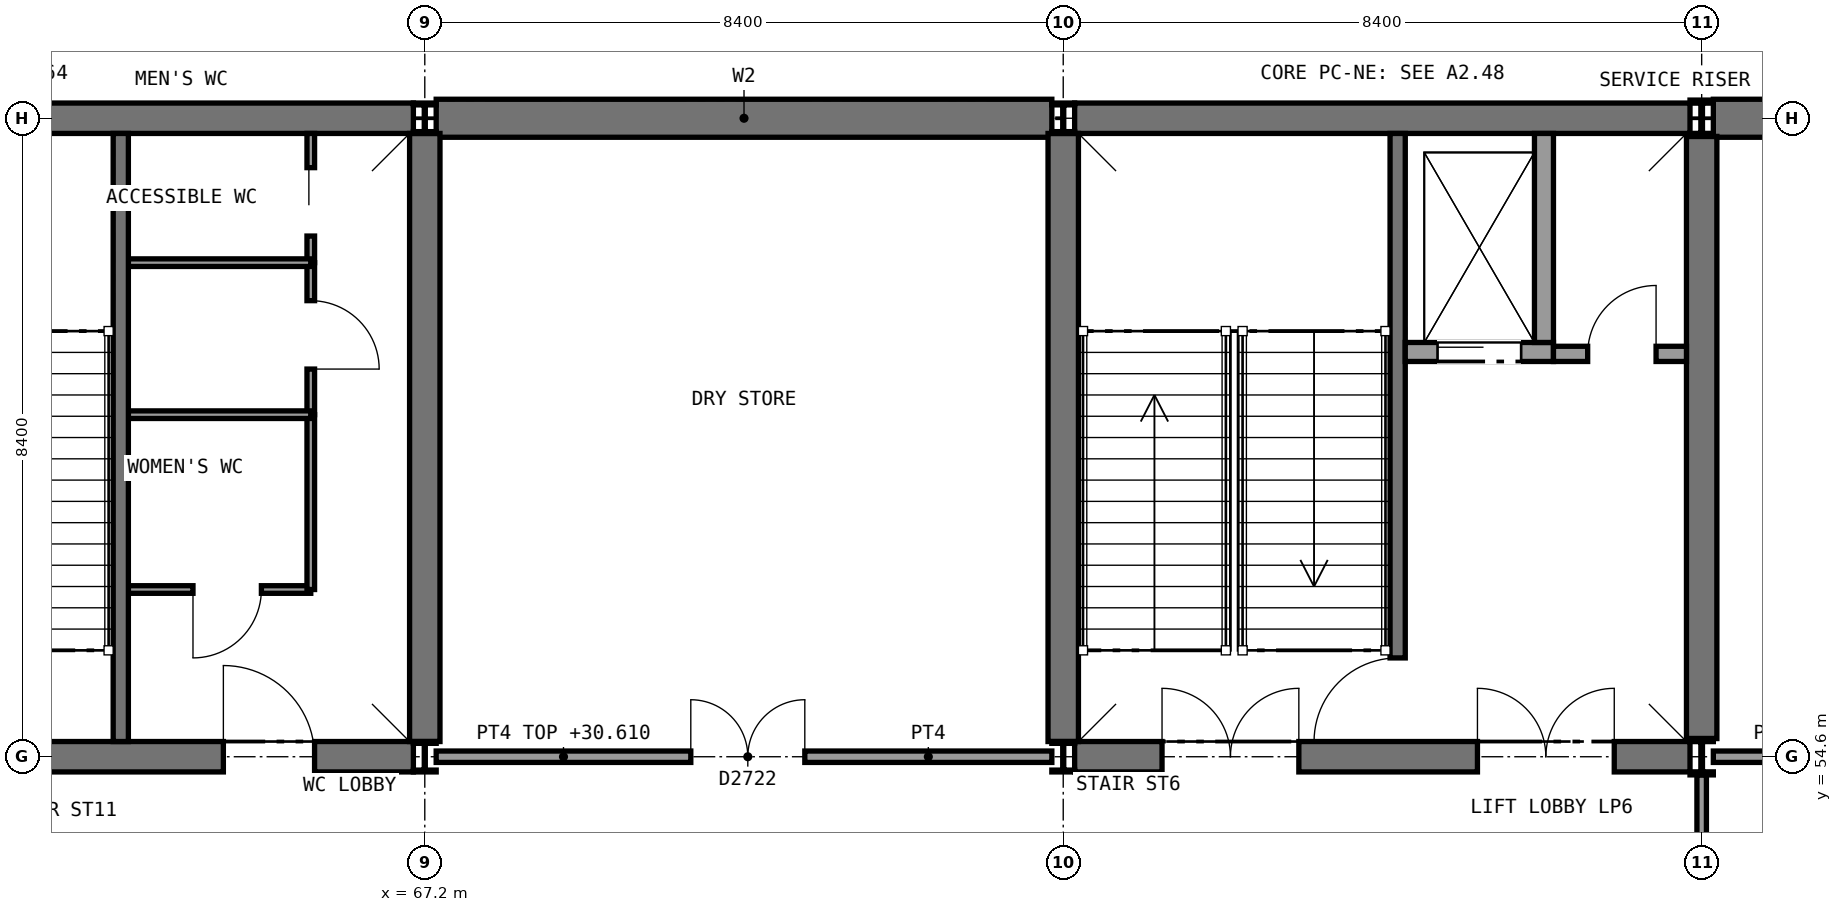
"""IFC4 building model, lengths in metres.
Left out: names, types, materials, properties, quantities, classifications, styles, units other than length and angle.
Written with IfcOpenShell. Run it as: python <this file> out.ifc"""

import sys

from ifc_helpers import new_model, si_unit, direction, frame, frame_2d, origin, origin_2d, place, context, subcontext, project, spatial, rectangle, i_section, extrude, element, fill, save


model = new_model("IFC4")
c1 = context("Model", 3, precision=1e-05, world=origin(), true_north=direction((0.0, 1.0)))
c2 = subcontext(c1, "Body", "Model", "MODEL_VIEW")
j1 = project(units=[si_unit("LENGTHUNIT", "METRE"), si_unit("PLANEANGLEUNIT", "RADIAN")], contexts=[c1])
p1 = place(None, origin())
s1 = spatial("IfcSite", under=j1, at=p1, CompositionType="ELEMENT")
p2 = place(p1, origin())
s2 = spatial("IfcBuilding", under=s1, at=p2, CompositionType="ELEMENT")
p3 = place(p2, frame((0.0, 0.0, 25.8)))
s3 = spatial("IfcBuildingStorey", under=s2, at=p3, CompositionType="ELEMENT", Elevation=25.8)
p4 = place(p3, frame((67.35, 63.0, 0.0), z_axis=(0.0, 0.0, 1.0), x_axis=(1.0, 0.0, 0.0)))
e1 = element("IfcWall", 1, at=p4, inside=s3, PredefinedType="SHEAR", context=c2, shape_type="SweptSolid", body=[
    extrude(rectangle(XDim=8.1, YDim=0.5, at=frame_2d((4.05, 0.0))), origin(), (0.0, 0.0, 1.0), 5.2),
])
p5 = place(p3, frame((84.154, 63.0, 0.0), z_axis=(0.0, 0.0, 1.0), x_axis=(1.0, 0.0, 0.0)))
e2 = element("IfcWall", 2, at=p5, inside=s3, PredefinedType="SHEAR", context=c2, shape_type="SweptSolid", body=[
    extrude(rectangle(XDim=8.093, YDim=0.5, at=frame_2d((4.046, 0.0))), origin(), (0.0, 0.0, 1.0), 5.25),
])
p6 = place(p3, frame((75.75, 63.0, 0.0), z_axis=(0.0, 0.0, 1.0), x_axis=(1.0, 0.0, 0.0)))
e3 = element("IfcWall", 3, at=p6, inside=s3, PredefinedType="SHEAR", context=c2, shape_type="SweptSolid", body=[
    extrude(rectangle(XDim=8.096, YDim=0.4, at=frame_2d((4.048, 0.0))), origin(), (0.0, 0.0, 1.0), 4.51),
])
p7 = place(p3, frame((75.75, 54.6, 0.0), z_axis=(0.0, 0.0, 1.0), x_axis=(1.0, 0.0, 0.0)))
e4 = element("IfcWall", 4, at=p7, inside=s3, PredefinedType="SHEAR", context=c2, shape_type="SweptSolid", body=[
    extrude(rectangle(XDim=8.096, YDim=0.4, at=frame_2d((4.048, 0.0))), origin(), (0.0, 0.0, 1.0), 4.51),
])
p8 = place(p7, frame((1.15, 0.0, 0.0)))
e5 = element("IfcOpeningElement", 5, at=p8, cuts=e4, PredefinedType="OPENING", context=c2, shape_type="SweptSolid", body=[
    extrude(rectangle(XDim=1.8, YDim=2.1, at=frame_2d((0.9, 1.05))), frame((0.0, 0.21, 0.0), z_axis=(0.0, -1.0, 0.0), x_axis=(1.0, 0.0, 0.0)), (0.0, 0.0, 1.0), 0.42),
])
p9 = place(p7, frame((5.3, 0.0, 0.0)))
e6 = element("IfcOpeningElement", 6, at=p9, cuts=e4, PredefinedType="OPENING", context=c2, shape_type="SweptSolid", body=[
    extrude(rectangle(XDim=1.8, YDim=2.1, at=frame_2d((0.9, 1.05))), frame((0.0, 0.21, 0.0), z_axis=(0.0, -1.0, 0.0), x_axis=(1.0, 0.0, 0.0)), (0.0, 0.0, 1.0), 0.42),
])
p10 = place(p3, frame((75.6, 54.8, 0.0), z_axis=(0.0, 0.0, 1.0), x_axis=(0.0, 1.0, 0.0)))
e7 = element("IfcWall", 7, at=p10, inside=s3, PredefinedType="SHEAR", context=c2, shape_type="SweptSolid", body=[
    extrude(rectangle(XDim=8.0, YDim=0.4, at=frame_2d((4.0, 0.0))), origin(), (0.0, 0.0, 1.0), 5.2),
])
p11 = place(p3, frame((84.0, 54.839, 0.0), z_axis=(0.0, 0.0, 1.0), x_axis=(0.0, 1.0, 0.0)))
e8 = element("IfcWall", 8, at=p11, inside=s3, PredefinedType="SHEAR", context=c2, shape_type="SweptSolid", body=[
    extrude(rectangle(XDim=7.922, YDim=0.4, at=frame_2d((3.961, 0.0))), origin(), (0.0, 0.0, 1.0), 5.2),
])
p12 = place(p3, frame((58.95, 63.0, 0.0), z_axis=(0.0, 0.0, 1.0), x_axis=(1.0, 0.0, 0.0)))
e9 = element("IfcWall", 9, at=p12, inside=s3, PredefinedType="SHEAR", context=c2, shape_type="SweptSolid", body=[
    extrude(rectangle(XDim=8.1, YDim=0.4, at=frame_2d((4.05, 0.0))), origin(), (0.0, 0.0, 1.0), 4.51),
])
p13 = place(p3, frame((58.95, 54.6, 0.0), z_axis=(0.0, 0.0, 1.0), x_axis=(1.0, 0.0, 0.0)))
e10 = element("IfcWall", 10, at=p13, inside=s3, PredefinedType="SHEAR", context=c2, shape_type="SweptSolid", body=[
    extrude(rectangle(XDim=8.1, YDim=0.4, at=frame_2d((4.05, 0.0))), origin(), (0.0, 0.0, 1.0), 4.51),
])
p14 = place(p13, frame((1.15, 0.0, 0.0)))
e11 = element("IfcOpeningElement", 11, at=p14, cuts=e10, PredefinedType="OPENING", context=c2, shape_type="SweptSolid", body=[
    extrude(rectangle(XDim=1.8, YDim=2.1, at=frame_2d((0.9, 1.05))), frame((0.0, 0.21, 0.0), z_axis=(0.0, -1.0, 0.0), x_axis=(1.0, 0.0, 0.0)), (0.0, 0.0, 1.0), 0.42),
])
p15 = place(p13, frame((5.6, 0.0, 0.0)))
e12 = element("IfcOpeningElement", 12, at=p15, cuts=e10, PredefinedType="OPENING", context=c2, shape_type="SweptSolid", body=[
    extrude(rectangle(XDim=1.2, YDim=2.1, at=frame_2d((0.6, 1.05))), frame((0.0, 0.21, 0.0), z_axis=(0.0, -1.0, 0.0), x_axis=(1.0, 0.0, 0.0)), (0.0, 0.0, 1.0), 0.42),
])
p16 = place(p3, frame((67.2, 54.8, 0.0), z_axis=(0.0, 0.0, 1.0), x_axis=(0.0, 1.0, 0.0)))
e13 = element("IfcWall", 13, at=p16, inside=s3, PredefinedType="SHEAR", context=c2, shape_type="SweptSolid", body=[
    extrude(rectangle(XDim=8.0, YDim=0.4, at=frame_2d((4.0, 0.0))), origin(), (0.0, 0.0, 1.0), 5.2),
])
for number, where, z_axis, x_axis in (
    (14, (67.2, 54.6, 0.0), (0.0, 0.0, 1.0), (1.0, 0.0, 0.0)),
    (15, (67.2, 63.0, 0.0), (0.0, 0.0, 1.0), (1.0, 0.0, 0.0)),
    (16, (75.6, 54.6, 0.0), (0.0, 0.0, 1.0), (1.0, 0.0, 0.0)),
    (17, (75.6, 63.0, 0.0), (0.0, 0.0, 1.0), (1.0, 0.0, 0.0)),
):
    element("IfcColumn", number, at=place(p3, frame(where, z_axis=z_axis, x_axis=x_axis)), inside=s3, PredefinedType="COLUMN", context=c2, shape_type="SweptSolid", body=[
        extrude(i_section(OverallWidth=0.3, OverallDepth=0.4, WebThickness=0.013, FlangeThickness=0.024, FilletRadius=0.027, at=origin_2d()), origin(), (0.0, 0.0, 1.0), 5.4),
    ])
for number, where, z_axis, x_axis in (
    (18, (84.0, 54.6, 0.0), (0.0, 0.0, 1.0), (1.0, 0.0, 0.0)),
    (19, (84.0, 63.0, 0.0), (0.0, 0.0, 1.0), (1.0, 0.0, 0.0)),
):
    element("IfcColumn", number, at=place(p3, frame(where, z_axis=z_axis, x_axis=x_axis)), inside=s3, PredefinedType="COLUMN", context=c2, shape_type="SweptSolid", body=[
        extrude(i_section(OverallWidth=0.307, OverallDepth=0.478, WebThickness=0.021, FlangeThickness=0.04, FilletRadius=0.027, at=origin_2d()), origin(), (0.0, 0.0, 1.0), 5.4),
    ])
p17 = place(p3, frame((63.3, 56.8, 0.0), z_axis=(0.0, 0.0, 1.0), x_axis=(1.0, 0.0, 0.0)))
e20 = element("IfcWall", 20, at=p17, inside=s3, PredefinedType="PARTITIONING", context=c2, shape_type="SweptSolid", body=[
    extrude(rectangle(XDim=2.4, YDim=0.1, at=frame_2d((1.2, 0.0))), origin(), (0.0, 0.0, 1.0), 5.2),
])
p18 = place(p17, frame((0.85, 0.0, 0.0)))
e21 = element("IfcOpeningElement", 21, at=p18, cuts=e20, PredefinedType="OPENING", context=c2, shape_type="SweptSolid", body=[
    extrude(rectangle(XDim=0.9, YDim=2.1, at=frame_2d((0.45, 1.05))), frame((0.0, 0.06, 0.0), z_axis=(0.0, -1.0, 0.0), x_axis=(1.0, 0.0, 0.0)), (0.0, 0.0, 1.0), 0.12),
])
p19 = place(p3, frame((65.7, 56.8, 0.0), z_axis=(0.0, 0.0, 1.0), x_axis=(0.0, 1.0, 0.0)))
e22 = element("IfcWall", 22, at=p19, inside=s3, PredefinedType="PARTITIONING", context=c2, shape_type="SweptSolid", body=[
    extrude(rectangle(XDim=2.3, YDim=0.1, at=frame_2d((1.15, 0.0))), origin(), (0.0, 0.0, 1.0), 5.2),
])
p20 = place(p3, frame((65.7, 59.1, 0.0), z_axis=(0.0, 0.0, 1.0), x_axis=(0.0, 1.0, 0.0)))
e23 = element("IfcWall", 23, at=p20, inside=s3, PredefinedType="PARTITIONING", context=c2, shape_type="SweptSolid", body=[
    extrude(rectangle(XDim=2.0, YDim=0.1, at=frame_2d((1.0, 0.0))), origin(), (0.0, 0.0, 1.0), 5.2),
])
p21 = place(p20, frame((0.6, 0.0, 0.0)))
e24 = element("IfcOpeningElement", 24, at=p21, cuts=e23, PredefinedType="OPENING", context=c2, shape_type="SweptSolid", body=[
    extrude(rectangle(XDim=0.9, YDim=2.1, at=frame_2d((0.45, 1.05))), frame((0.0, 0.06, 0.0), z_axis=(0.0, -1.0, 0.0), x_axis=(1.0, 0.0, 0.0)), (0.0, 0.0, 1.0), 0.12),
])
p22 = place(p3, frame((65.7, 61.1, 0.0), z_axis=(0.0, 0.0, 1.0), x_axis=(0.0, 1.0, 0.0)))
e25 = element("IfcWall", 25, at=p22, inside=s3, PredefinedType="PARTITIONING", context=c2, shape_type="SweptSolid", body=[
    extrude(rectangle(XDim=1.7, YDim=0.1, at=frame_2d((0.85, 0.0))), origin(), (0.0, 0.0, 1.0), 5.2),
])
p23 = place(p22, frame((0.35, 0.0, 0.0)))
e26 = element("IfcOpeningElement", 26, at=p23, cuts=e25, PredefinedType="OPENING", context=c2, shape_type="SweptSolid", body=[
    extrude(rectangle(XDim=0.9, YDim=2.1, at=frame_2d((0.45, 1.05))), frame((0.0, 0.06, 0.0), z_axis=(0.0, -1.0, 0.0), x_axis=(1.0, 0.0, 0.0)), (0.0, 0.0, 1.0), 0.12),
])
for number, where, z_axis, x_axis in (
    (27, (63.3, 59.1, 0.0), (0.0, 0.0, 1.0), (1.0, 0.0, 0.0)),
    (28, (63.3, 61.1, 0.0), (0.0, 0.0, 1.0), (1.0, 0.0, 0.0)),
):
    element("IfcWall", number, at=place(p3, frame(where, z_axis=z_axis, x_axis=x_axis)), inside=s3, PredefinedType="PARTITIONING", context=c2, shape_type="SweptSolid", body=[
        extrude(rectangle(XDim=2.4, YDim=0.1, at=frame_2d((1.2, 0.0))), origin(), (0.0, 0.0, 1.0), 5.2),
    ])
p24 = place(p3, frame((67.35, 54.6, 0.0), z_axis=(0.0, 0.0, 1.0), x_axis=(1.0, 0.0, 0.0)))
e29 = element("IfcWall", 29, at=p24, inside=s3, PredefinedType="SOLIDWALL", context=c2, shape_type="SweptSolid", body=[
    extrude(rectangle(XDim=8.1, YDim=0.15, at=frame_2d((4.05, 0.0))), origin(), (0.0, 0.0, 1.0), 4.81),
])
p25 = place(p24, frame((3.35, 0.0, 0.0)))
e30 = element("IfcOpeningElement", 30, at=p25, cuts=e29, PredefinedType="OPENING", context=c2, shape_type="SweptSolid", body=[
    extrude(rectangle(XDim=1.5, YDim=2.1, at=frame_2d((0.75, 1.05))), frame((0.0, 0.085, 0.0), z_axis=(0.0, -1.0, 0.0), x_axis=(1.0, 0.0, 0.0)), (0.0, 0.0, 1.0), 0.17),
])
p26 = place(p3, frame((84.154, 54.6, 0.0), z_axis=(0.0, 0.0, 1.0), x_axis=(1.0, 0.0, 0.0)))
e31 = element("IfcWall", 31, at=p26, inside=s3, PredefinedType="SOLIDWALL", context=c2, shape_type="SweptSolid", body=[
    extrude(rectangle(XDim=8.093, YDim=0.15, at=frame_2d((4.046, 0.0))), origin(), (0.0, 0.0, 1.0), 4.92),
])
p27 = place(p26, frame((3.35, 0.0, 0.0)))
e32 = element("IfcOpeningElement", 32, at=p27, cuts=e31, PredefinedType="OPENING", context=c2, shape_type="SweptSolid", body=[
    extrude(rectangle(XDim=1.5, YDim=2.1, at=frame_2d((0.75, 1.05))), frame((0.0, 0.085, 0.0), z_axis=(0.0, -1.0, 0.0), x_axis=(1.0, 0.0, 0.0)), (0.0, 0.0, 1.0), 0.17),
])
p28 = place(p3, frame((84.0, 46.439, 0.0), z_axis=(0.0, 0.0, 1.0), x_axis=(0.0, 1.0, 0.0)))
e33 = element("IfcWall", 33, at=p28, inside=s3, PredefinedType="PARTITIONING", context=c2, shape_type="SweptSolid", body=[
    extrude(rectangle(XDim=7.922, YDim=0.125, at=frame_2d((3.961, 0.0))), origin(), (0.0, 0.0, 1.0), 4.76),
])
p29 = place(p28, frame((3.1, 0.0, 0.0)))
e34 = element("IfcOpeningElement", 34, at=p29, cuts=e33, PredefinedType="OPENING", context=c2, shape_type="SweptSolid", body=[
    extrude(rectangle(XDim=1.8, YDim=2.1, at=frame_2d((0.9, 1.05))), frame((0.0, 0.073, 0.0), z_axis=(0.0, -1.0, 0.0), x_axis=(1.0, 0.0, 0.0)), (0.0, 0.0, 1.0), 0.145),
])
p30 = place(p3, frame((80.0, 62.8, 0.0), z_axis=(0.0, 0.0, 1.0), x_axis=(0.0, -1.0, 0.0)))
e35 = element("IfcWall", 35, at=p30, inside=s3, PredefinedType="SHEAR", context=c2, shape_type="SweptSolid", body=[
    extrude(rectangle(XDim=8.0, YDim=0.2, at=frame_2d((4.0, 0.0))), origin(), (0.0, 0.0, 1.0), 5.2),
])
p31 = place(p30, frame((6.9, 0.0, 0.0)))
e36 = element("IfcOpeningElement", 36, at=p31, cuts=e35, PredefinedType="OPENING", context=c2, shape_type="SweptSolid", body=[
    extrude(rectangle(XDim=1.11, YDim=2.1, at=frame_2d((0.555, 1.05))), frame((0.0, 0.11, 0.0), z_axis=(0.0, -1.0, 0.0), x_axis=(1.0, 0.0, 0.0)), (0.0, 0.0, 1.0), 0.22),
])
p32 = place(p3, frame((80.1, 59.925, 0.0), z_axis=(0.0, 0.0, 1.0), x_axis=(1.0, 0.0, 0.0)))
e37 = element("IfcWall", 37, at=p32, inside=s3, PredefinedType="SOLIDWALL", context=c2, shape_type="SweptSolid", body=[
    extrude(rectangle(XDim=1.95, YDim=0.25, at=frame_2d((0.975, 0.0))), origin(), (0.0, 0.0, 1.0), 5.2),
])
p33 = place(p32, frame((0.425, 0.0, 0.0)))
e38 = element("IfcOpeningElement", 38, at=p33, cuts=e37, PredefinedType="OPENING", context=c2, shape_type="SweptSolid", body=[
    extrude(rectangle(XDim=1.1, YDim=2.1, at=frame_2d((0.55, 1.05))), frame((0.0, 0.135, 0.0), z_axis=(0.0, -1.0, 0.0), x_axis=(1.0, 0.0, 0.0)), (0.0, 0.0, 1.0), 0.27),
])
p34 = place(p3, frame((81.925, 62.8, 0.0), z_axis=(0.0, 0.0, 1.0), x_axis=(0.0, -1.0, 0.0)))
e39 = element("IfcWall", 39, at=p34, inside=s3, PredefinedType="SOLIDWALL", context=c2, shape_type="SweptSolid", body=[
    extrude(rectangle(XDim=2.75, YDim=0.25, at=frame_2d((1.375, 0.0))), origin(), (0.0, 0.0, 1.0), 5.2),
])
p35 = place(p3, frame((82.05, 59.9, 0.0), z_axis=(0.0, 0.0, 1.0), x_axis=(1.0, 0.0, 0.0)))
e40 = element("IfcWall", 40, at=p35, inside=s3, PredefinedType="PARTITIONING", context=c2, shape_type="SweptSolid", body=[
    extrude(rectangle(XDim=1.75, YDim=0.2, at=frame_2d((0.875, 0.0))), origin(), (0.0, 0.0, 1.0), 5.2),
])
p36 = place(p35, frame((0.45, 0.0, 0.0)))
e41 = element("IfcOpeningElement", 41, at=p36, cuts=e40, PredefinedType="OPENING", context=c2, shape_type="SweptSolid", body=[
    extrude(rectangle(XDim=0.9, YDim=2.1, at=frame_2d((0.45, 1.05))), frame((0.0, 0.11, 0.0), z_axis=(0.0, -1.0, 0.0), x_axis=(1.0, 0.0, 0.0)), (0.0, 0.0, 1.0), 0.22),
])
p37 = place(p3, frame((63.2, 62.8, 0.0), z_axis=(0.0, 0.0, 1.0), x_axis=(0.0, -1.0, 0.0)))
e42 = element("IfcWall", 42, at=p37, inside=s3, PredefinedType="SHEAR", context=c2, shape_type="SweptSolid", body=[
    extrude(rectangle(XDim=8.0, YDim=0.2, at=frame_2d((4.0, 0.0))), origin(), (0.0, 0.0, 1.0), 5.2),
])
p38 = place(p18, frame((0.9, 0.0, 0.0), z_axis=(0.0, 0.0, 1.0), x_axis=(-1.0, 0.0, 0.0)))
e43 = element("IfcDoor", 43, at=p38, inside=s3, OperationType="SINGLE_SWING_RIGHT", PredefinedType="DOOR", context=c2, shape_type="SweptSolid", body=[
    extrude(rectangle(XDim=0.9, YDim=2.1, at=frame_2d((0.45, 1.05))), frame((0.0, 0.025, 0.0), z_axis=(0.0, -1.0, 0.0), x_axis=(1.0, 0.0, 0.0)), (0.0, 0.0, 1.0), 0.05),
])
fill(e21, e43)
p39 = place(p21, frame((0.9, 0.0, 0.0), z_axis=(0.0, 0.0, 1.0), x_axis=(-1.0, 0.0, 0.0)))
e44 = element("IfcDoor", 44, at=p39, inside=s3, OperationType="SINGLE_SWING_RIGHT", PredefinedType="DOOR", context=c2, shape_type="SweptSolid", body=[
    extrude(rectangle(XDim=0.9, YDim=2.1, at=frame_2d((0.45, 1.05))), frame((0.0, 0.025, 0.0), z_axis=(0.0, -1.0, 0.0), x_axis=(1.0, 0.0, 0.0)), (0.0, 0.0, 1.0), 0.05),
])
fill(e24, e44)
p40 = place(p23, origin())
e45 = element("IfcDoor", 45, at=p40, inside=s3, OperationType="SLIDING_TO_RIGHT", PredefinedType="DOOR", context=c2, shape_type="SweptSolid", body=[
    extrude(rectangle(XDim=0.9, YDim=2.1, at=frame_2d((0.45, 1.05))), frame((0.0, 0.025, 0.0), z_axis=(0.0, -1.0, 0.0), x_axis=(1.0, 0.0, 0.0)), (0.0, 0.0, 1.0), 0.05),
])
fill(e26, e45)
p41 = place(p25, origin())
e46 = element("IfcDoor", 46, at=p41, inside=s3, OperationType="DOUBLE_DOOR_SINGLE_SWING", PredefinedType="DOOR", context=c2, shape_type="SweptSolid", body=[
    extrude(rectangle(XDim=1.5, YDim=2.1, at=frame_2d((0.75, 1.05))), frame((0.0, 0.025, 0.0), z_axis=(0.0, -1.0, 0.0), x_axis=(1.0, 0.0, 0.0)), (0.0, 0.0, 1.0), 0.05),
])
fill(e30, e46)
p42 = place(p31, frame((1.1, 0.0, 0.0), z_axis=(0.0, 0.0, 1.0), x_axis=(-1.0, 0.0, 0.0)))
e47 = element("IfcDoor", 47, at=p42, inside=s3, OperationType="SINGLE_SWING_LEFT", PredefinedType="DOOR", context=c2, shape_type="SweptSolid", body=[
    extrude(rectangle(XDim=1.1, YDim=2.1, at=frame_2d((0.55, 1.05))), frame((0.0, 0.025, 0.0), z_axis=(0.0, -1.0, 0.0), x_axis=(1.0, 0.0, 0.0)), (0.0, 0.0, 1.0), 0.05),
])
fill(e36, e47)
p43 = place(p33, frame((1.1, 0.0, 0.0), z_axis=(0.0, 0.0, 1.0), x_axis=(-1.0, 0.0, 0.0)))
e48 = element("IfcDoor", 48, at=p43, inside=s3, OperationType="SLIDING_TO_RIGHT", PredefinedType="DOOR", context=c2, shape_type="SweptSolid", body=[
    extrude(rectangle(XDim=1.1, YDim=2.1, at=frame_2d((0.55, 1.05))), frame((0.0, 0.025, 0.0), z_axis=(0.0, -1.0, 0.0), x_axis=(1.0, 0.0, 0.0)), (0.0, 0.0, 1.0), 0.05),
])
fill(e38, e48)
p44 = place(p36, origin())
e49 = element("IfcDoor", 49, at=p44, inside=s3, OperationType="SINGLE_SWING_RIGHT", PredefinedType="DOOR", context=c2, shape_type="SweptSolid", body=[
    extrude(rectangle(XDim=0.9, YDim=2.1, at=frame_2d((0.45, 1.05))), frame((0.0, 0.025, 0.0), z_axis=(0.0, -1.0, 0.0), x_axis=(1.0, 0.0, 0.0)), (0.0, 0.0, 1.0), 0.05),
])
fill(e41, e49)
p45 = place(p8, origin())
e50 = element("IfcDoor", 50, at=p45, inside=s3, OperationType="DOUBLE_DOOR_SINGLE_SWING", PredefinedType="DOOR", context=c2, shape_type="SweptSolid", body=[
    extrude(rectangle(XDim=1.8, YDim=2.1, at=frame_2d((0.9, 1.05))), frame((0.0, 0.025, 0.0), z_axis=(0.0, -1.0, 0.0), x_axis=(1.0, 0.0, 0.0)), (0.0, 0.0, 1.0), 0.05),
])
fill(e5, e50)
p46 = place(p9, origin())
e51 = element("IfcDoor", 51, at=p46, inside=s3, OperationType="DOUBLE_DOOR_SINGLE_SWING", PredefinedType="DOOR", context=c2, shape_type="SweptSolid", body=[
    extrude(rectangle(XDim=1.8, YDim=2.1, at=frame_2d((0.9, 1.05))), frame((0.0, 0.025, 0.0), z_axis=(0.0, -1.0, 0.0), x_axis=(1.0, 0.0, 0.0)), (0.0, 0.0, 1.0), 0.05),
])
fill(e6, e51)
p47 = place(p15, origin())
e52 = element("IfcDoor", 52, at=p47, inside=s3, OperationType="SINGLE_SWING_LEFT", PredefinedType="DOOR", context=c2, shape_type="SweptSolid", body=[
    extrude(rectangle(XDim=1.2, YDim=2.1, at=frame_2d((0.6, 1.05))), frame((0.0, 0.025, 0.0), z_axis=(0.0, -1.0, 0.0), x_axis=(1.0, 0.0, 0.0)), (0.0, 0.0, 1.0), 0.05),
])
fill(e12, e52)
save(model, sys.argv[1])
